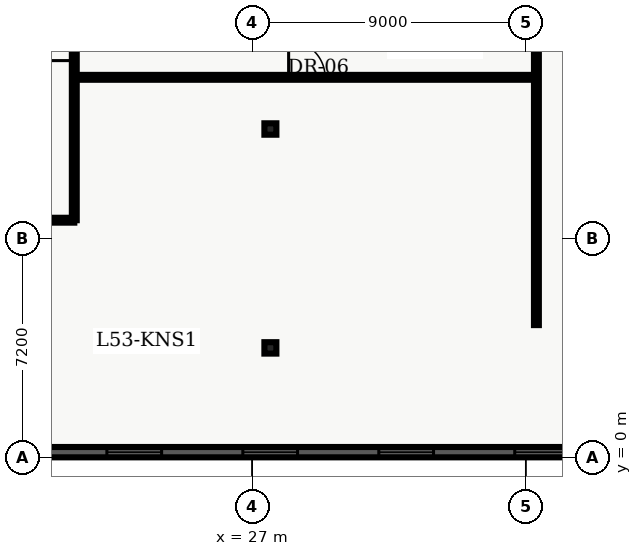
"""IFC4 building model, lengths in metres.
Left out: names, types, materials, properties, quantities, classifications, styles, units other than length and angle.
Written with IfcOpenShell. Run it as: python <this file> out.ifc"""

import sys

from ifc_helpers import new_model, entity, si_unit, converted_unit, direction, frame, origin_with_axes, origin_2d_with_axis, place, context, subcontext, project, spatial, polyline, rectangle, i_section, outline, extrude, element, fill, save


model = new_model("IFC4")
c1 = context("Model", 3, precision=1e-05, world=origin_with_axes(), true_north=direction((0.0, 1.0)))
c2 = subcontext(c1, "Body", "Model", "MODEL_VIEW")
j1 = project(units=[si_unit("LENGTHUNIT", "METRE"), converted_unit("PLANEANGLEUNIT", "DEGREE", entity("IfcPlaneAngleMeasure", 0.017), si_unit("PLANEANGLEUNIT", "RADIAN"), dimensions=[0, 0, 0, 0, 0, 0, 0])], contexts=[c1])
p1 = place(None, origin_with_axes())
s1 = spatial("IfcSite", under=j1, at=p1, CompositionType="ELEMENT")
p2 = place(p1, origin_with_axes())
s2 = spatial("IfcBuilding", under=s1, at=p2, CompositionType="ELEMENT")
p3 = place(p2, frame((0.0, 0.0, 216.0), z_axis=(0.0, 0.0, 1.0), x_axis=(1.0, 0.0, 0.0)))
s3 = spatial("IfcBuildingStorey", under=s2, at=p3, CompositionType="ELEMENT", Elevation=216.0)
for number, where, z_axis, x_axis in (
    (1, (27.6, 3.6, 0.0), (0.0, 0.0, 1.0), (1.0, 0.0, 0.0)),
    (2, (27.6, 10.8, 0.0), (0.0, 0.0, 1.0), (1.0, 0.0, 0.0)),
):
    element("IfcColumn", number, at=place(p3, frame(where, z_axis=z_axis, x_axis=x_axis)), inside=s3, PredefinedType="COLUMN", context=c2, shape_type="SweptSolid", body=[
        extrude(i_section(OverallWidth=0.394, OverallDepth=0.375, WebThickness=0.017, FlangeThickness=0.028, FilletRadius=0.02, at=origin_2d_with_axis()), origin_with_axes(), (0.0, 0.0, 1.0), 3.9),
    ])
p4 = place(p3, frame((2.6, 7.8, 0.0), z_axis=(0.0, 0.0, 1.0), x_axis=(1.0, 0.0, 0.0)))
e3 = element("IfcWall", 3, at=p4, inside=s3, PredefinedType="PARTITIONING", context=c2, shape_type="SweptSolid", body=[
    extrude(outline(polyline([(0.0, -0.08), (18.55, -0.08), (18.55, 0.08), (0.0, 0.08), (0.0, -0.08)])), origin_with_axes(), (0.0, 0.0, 1.0), 2.64),
])
p5 = place(p4, frame((2.158, 0.0, 0.0), z_axis=(0.0, 0.0, 1.0), x_axis=(1.0, 0.0, 0.0)))
e4 = element("IfcOpeningElement", 4, at=p5, cuts=e3, PredefinedType="OPENING", context=c2, shape_type="SweptSolid", body=[
    extrude(rectangle(XDim=1.0, YDim=0.18, at=origin_2d_with_axis()), origin_with_axes(), (0.0, 0.0, 1.0), 2.15),
])
p6 = place(p4, frame((6.563, 0.0, 0.0), z_axis=(0.0, 0.0, 1.0), x_axis=(1.0, 0.0, 0.0)))
e5 = element("IfcOpeningElement", 5, at=p6, cuts=e3, PredefinedType="OPENING", context=c2, shape_type="SweptSolid", body=[
    extrude(rectangle(XDim=1.0, YDim=0.18, at=origin_2d_with_axis()), origin_with_axes(), (0.0, 0.0, 1.0), 2.15),
])
p7 = place(p4, frame((11.931, 0.0, 0.0), z_axis=(0.0, 0.0, 1.0), x_axis=(1.0, 0.0, 0.0)))
e6 = element("IfcOpeningElement", 6, at=p7, cuts=e3, PredefinedType="OPENING", context=c2, shape_type="SweptSolid", body=[
    extrude(rectangle(XDim=1.0, YDim=0.18, at=origin_2d_with_axis()), origin_with_axes(), (0.0, 0.0, 1.0), 2.15),
])
p8 = place(p4, frame((16.501, 0.0, 0.0), z_axis=(0.0, 0.0, 1.0), x_axis=(1.0, 0.0, 0.0)))
e7 = element("IfcOpeningElement", 7, at=p8, cuts=e3, PredefinedType="OPENING", context=c2, shape_type="SweptSolid", body=[
    extrude(rectangle(XDim=1.0, YDim=0.18, at=origin_2d_with_axis()), origin_with_axes(), (0.0, 0.0, 1.0), 2.15),
])
p9 = place(p3, frame((21.15, 7.8, 0.0), z_axis=(0.0, 0.0, 1.0), x_axis=(0.0, 1.0, 0.0)))
e8 = element("IfcWall", 8, at=p9, inside=s3, PredefinedType="PARTITIONING", context=c2, shape_type="SweptSolid", body=[
    extrude(outline(polyline([(0.0, -0.08), (32.7, -0.08), (32.7, 0.08), (0.0, 0.08), (0.0, -0.08)])), origin_with_axes(), (0.0, 0.0, 1.0), 2.64),
])
p10 = place(p9, frame((16.495, 0.0, 0.0), z_axis=(0.0, 0.0, 1.0), x_axis=(1.0, 0.0, 0.0)))
e9 = element("IfcOpeningElement", 9, at=p10, cuts=e8, PredefinedType="OPENING", context=c2, shape_type="SweptSolid", body=[
    extrude(rectangle(XDim=1.0, YDim=0.18, at=origin_2d_with_axis()), origin_with_axes(), (0.0, 0.0, 1.0), 2.15),
])
p11 = place(p9, frame((22.084, 0.0, 0.0), z_axis=(0.0, 0.0, 1.0), x_axis=(1.0, 0.0, 0.0)))
e10 = element("IfcOpeningElement", 10, at=p11, cuts=e8, PredefinedType="OPENING", context=c2, shape_type="SweptSolid", body=[
    extrude(rectangle(XDim=1.0, YDim=0.18, at=origin_2d_with_axis()), origin_with_axes(), (0.0, 0.0, 1.0), 2.15),
])
p12 = place(p9, frame((28.839, 0.0, 0.0), z_axis=(0.0, 0.0, 1.0), x_axis=(1.0, 0.0, 0.0)))
e11 = element("IfcOpeningElement", 11, at=p12, cuts=e8, PredefinedType="OPENING", context=c2, shape_type="SweptSolid", body=[
    extrude(rectangle(XDim=1.0, YDim=0.18, at=origin_2d_with_axis()), origin_with_axes(), (0.0, 0.0, 1.0), 2.15),
])
p13 = place(p9, frame((5.775, 0.0, 0.0), z_axis=(0.0, 0.0, 1.0), x_axis=(1.0, 0.0, 0.0)))
e12 = element("IfcOpeningElement", 12, at=p13, cuts=e8, PredefinedType="OPENING", context=c2, shape_type="SweptSolid", body=[
    extrude(rectangle(XDim=1.05, YDim=0.18, at=origin_2d_with_axis()), origin_with_axes(), (0.0, 0.0, 1.0), 2.15),
])
p14 = place(p3, frame((21.15, 12.5, 0.0), z_axis=(0.0, 0.0, 1.0), x_axis=(1.0, 0.0, 0.0)))
e13 = element("IfcWall", 13, at=p14, inside=s3, PredefinedType="PARTITIONING", context=c2, shape_type="SweptSolid", body=[
    extrude(outline(polyline([(0.0, -0.08), (15.2, -0.08), (15.2, 0.08), (0.0, 0.08), (0.0, -0.08)])), origin_with_axes(), (0.0, 0.0, 1.0), 2.64),
])
p15 = place(p14, frame((7.65, 0.0, 0.0), z_axis=(0.0, 0.0, 1.0), x_axis=(1.0, 0.0, 0.0)))
e14 = element("IfcOpeningElement", 14, at=p15, cuts=e13, PredefinedType="OPENING", context=c2, shape_type="SweptSolid", body=[
    extrude(rectangle(XDim=1.2, YDim=0.18, at=origin_2d_with_axis()), origin_with_axes(), (0.0, 0.0, 1.0), 2.2),
])
p16 = place(p3, frame((36.35, 4.35, 0.0), z_axis=(0.0, 0.0, 1.0), x_axis=(0.0, 1.0, 0.0)))
e15 = element("IfcWall", 15, at=p16, inside=s3, PredefinedType="PARTITIONING", context=c2, shape_type="SweptSolid", body=[
    extrude(outline(polyline([(0.0, -0.08), (16.95, -0.08), (16.95, 0.08), (0.0, 0.08), (0.0, -0.08)])), origin_with_axes(), (0.0, 0.0, 1.0), 2.64),
])
p17 = place(p3, frame((57.26, 0.17, 0.0), z_axis=(0.0, 0.0, 1.0), x_axis=(-1.0, 0.0, 0.0)))
e16 = element("IfcWall", 16, at=p17, inside=s3, PredefinedType="SOLIDWALL", context=c2, shape_type="SweptSolid", body=[
    extrude(outline(polyline([(0.0, -0.17), (54.86, -0.17), (54.86, 0.17), (0.0, 0.17), (0.0, -0.17)])), origin_with_axes(), (0.0, 0.0, 1.0), 3.6),
])
p18 = place(p17, frame((2.836, 0.0, 0.45), z_axis=(0.0, 0.0, 1.0), x_axis=(1.0, 0.0, 0.0)))
e17 = element("IfcOpeningElement", 17, at=p18, cuts=e16, PredefinedType="OPENING", context=c2, shape_type="SweptSolid", body=[
    extrude(rectangle(XDim=1.8, YDim=0.36, at=origin_2d_with_axis()), origin_with_axes(), (0.0, 0.0, 1.0), 2.1),
])
p19 = place(p17, frame((7.307, 0.0, 0.45), z_axis=(0.0, 0.0, 1.0), x_axis=(1.0, 0.0, 0.0)))
e18 = element("IfcOpeningElement", 18, at=p19, cuts=e16, PredefinedType="OPENING", context=c2, shape_type="SweptSolid", body=[
    extrude(rectangle(XDim=1.8, YDim=0.36, at=origin_2d_with_axis()), origin_with_axes(), (0.0, 0.0, 1.0), 2.1),
])
p20 = place(p17, frame((11.779, 0.0, 0.45), z_axis=(0.0, 0.0, 1.0), x_axis=(1.0, 0.0, 0.0)))
e19 = element("IfcOpeningElement", 19, at=p20, cuts=e16, PredefinedType="OPENING", context=c2, shape_type="SweptSolid", body=[
    extrude(rectangle(XDim=1.8, YDim=0.36, at=origin_2d_with_axis()), origin_with_axes(), (0.0, 0.0, 1.0), 2.1),
])
p21 = place(p17, frame((16.251, 0.0, 0.45), z_axis=(0.0, 0.0, 1.0), x_axis=(1.0, 0.0, 0.0)))
e20 = element("IfcOpeningElement", 20, at=p21, cuts=e16, PredefinedType="OPENING", context=c2, shape_type="SweptSolid", body=[
    extrude(rectangle(XDim=1.8, YDim=0.36, at=origin_2d_with_axis()), origin_with_axes(), (0.0, 0.0, 1.0), 2.1),
])
p22 = place(p17, frame((20.723, 0.0, 0.45), z_axis=(0.0, 0.0, 1.0), x_axis=(1.0, 0.0, 0.0)))
e21 = element("IfcOpeningElement", 21, at=p22, cuts=e16, PredefinedType="OPENING", context=c2, shape_type="SweptSolid", body=[
    extrude(rectangle(XDim=1.8, YDim=0.36, at=origin_2d_with_axis()), origin_with_axes(), (0.0, 0.0, 1.0), 2.1),
])
p23 = place(p17, frame((25.194, 0.0, 0.45), z_axis=(0.0, 0.0, 1.0), x_axis=(1.0, 0.0, 0.0)))
e22 = element("IfcOpeningElement", 22, at=p23, cuts=e16, PredefinedType="OPENING", context=c2, shape_type="SweptSolid", body=[
    extrude(rectangle(XDim=1.8, YDim=0.36, at=origin_2d_with_axis()), origin_with_axes(), (0.0, 0.0, 1.0), 2.1),
])
p24 = place(p17, frame((29.666, 0.0, 0.45), z_axis=(0.0, 0.0, 1.0), x_axis=(1.0, 0.0, 0.0)))
e23 = element("IfcOpeningElement", 23, at=p24, cuts=e16, PredefinedType="OPENING", context=c2, shape_type="SweptSolid", body=[
    extrude(rectangle(XDim=1.8, YDim=0.36, at=origin_2d_with_axis()), origin_with_axes(), (0.0, 0.0, 1.0), 2.1),
])
p25 = place(p17, frame((34.138, 0.0, 0.45), z_axis=(0.0, 0.0, 1.0), x_axis=(1.0, 0.0, 0.0)))
e24 = element("IfcOpeningElement", 24, at=p25, cuts=e16, PredefinedType="OPENING", context=c2, shape_type="SweptSolid", body=[
    extrude(rectangle(XDim=1.8, YDim=0.36, at=origin_2d_with_axis()), origin_with_axes(), (0.0, 0.0, 1.0), 2.1),
])
p26 = place(p17, frame((38.159, 0.0, 0.45), z_axis=(0.0, 0.0, 1.0), x_axis=(1.0, 0.0, 0.0)))
e25 = element("IfcOpeningElement", 25, at=p26, cuts=e16, PredefinedType="OPENING", context=c2, shape_type="SweptSolid", body=[
    extrude(rectangle(XDim=1.8, YDim=0.36, at=origin_2d_with_axis()), origin_with_axes(), (0.0, 0.0, 1.0), 2.1),
])
p27 = place(p17, frame((43.081, 0.0, 0.45), z_axis=(0.0, 0.0, 1.0), x_axis=(1.0, 0.0, 0.0)))
e26 = element("IfcOpeningElement", 26, at=p27, cuts=e16, PredefinedType="OPENING", context=c2, shape_type="SweptSolid", body=[
    extrude(rectangle(XDim=1.8, YDim=0.36, at=origin_2d_with_axis()), origin_with_axes(), (0.0, 0.0, 1.0), 2.1),
])
p28 = place(p17, frame((47.553, 0.0, 0.45), z_axis=(0.0, 0.0, 1.0), x_axis=(1.0, 0.0, 0.0)))
e27 = element("IfcOpeningElement", 27, at=p28, cuts=e16, PredefinedType="OPENING", context=c2, shape_type="SweptSolid", body=[
    extrude(rectangle(XDim=1.8, YDim=0.36, at=origin_2d_with_axis()), origin_with_axes(), (0.0, 0.0, 1.0), 2.1),
])
p29 = place(p17, frame((52.024, 0.0, 0.45), z_axis=(0.0, 0.0, 1.0), x_axis=(1.0, 0.0, 0.0)))
e28 = element("IfcOpeningElement", 28, at=p29, cuts=e16, PredefinedType="OPENING", context=c2, shape_type="SweptSolid", body=[
    extrude(rectangle(XDim=1.8, YDim=0.36, at=origin_2d_with_axis()), origin_with_axes(), (0.0, 0.0, 1.0), 2.1),
])
p30 = place(p9, frame((5.775, 0.0, 0.0), z_axis=(0.0, 0.0, 1.0), x_axis=(1.0, 0.0, 0.0)))
e29 = element("IfcDoor", 29, at=p30, inside=s3, OperationType="SINGLE_SWING_LEFT", PredefinedType="DOOR", context=c2, shape_type="SweptSolid", body=[
    extrude(rectangle(XDim=1.05, YDim=0.09, at=origin_2d_with_axis()), origin_with_axes(), (0.0, 0.0, 1.0), 2.15),
])
fill(e12, e29)
p31 = place(p14, frame((7.65, 0.0, 0.0), z_axis=(0.0, 0.0, 1.0), x_axis=(1.0, 0.0, 0.0)))
e30 = element("IfcDoor", 30, at=p31, inside=s3, OperationType="SINGLE_SWING_LEFT", PredefinedType="DOOR", context=c2, shape_type="SweptSolid", body=[
    extrude(rectangle(XDim=1.2, YDim=0.09, at=origin_2d_with_axis()), origin_with_axes(), (0.0, 0.0, 1.0), 2.2),
])
fill(e14, e30)
p32 = place(p17, frame((20.723, 0.0, 0.45), z_axis=(0.0, 0.0, 1.0), x_axis=(1.0, 0.0, 0.0)))
e31 = element("IfcWindow", 31, at=p32, inside=s3, PredefinedType="WINDOW", context=c2, shape_type="SweptSolid", body=[
    extrude(rectangle(XDim=1.8, YDim=0.09, at=origin_2d_with_axis()), origin_with_axes(), (0.0, 0.0, 1.0), 2.1),
])
fill(e21, e31)
p33 = place(p17, frame((25.194, 0.0, 0.45), z_axis=(0.0, 0.0, 1.0), x_axis=(1.0, 0.0, 0.0)))
e32 = element("IfcWindow", 32, at=p33, inside=s3, PredefinedType="WINDOW", context=c2, shape_type="SweptSolid", body=[
    extrude(rectangle(XDim=1.8, YDim=0.09, at=origin_2d_with_axis()), origin_with_axes(), (0.0, 0.0, 1.0), 2.1),
])
fill(e22, e32)
p34 = place(p17, frame((29.666, 0.0, 0.45), z_axis=(0.0, 0.0, 1.0), x_axis=(1.0, 0.0, 0.0)))
e33 = element("IfcWindow", 33, at=p34, inside=s3, PredefinedType="WINDOW", context=c2, shape_type="SweptSolid", body=[
    extrude(rectangle(XDim=1.8, YDim=0.09, at=origin_2d_with_axis()), origin_with_axes(), (0.0, 0.0, 1.0), 2.1),
])
fill(e23, e33)
p35 = place(p17, frame((34.138, 0.0, 0.45), z_axis=(0.0, 0.0, 1.0), x_axis=(1.0, 0.0, 0.0)))
e34 = element("IfcWindow", 34, at=p35, inside=s3, PredefinedType="WINDOW", context=c2, shape_type="SweptSolid", body=[
    extrude(rectangle(XDim=1.8, YDim=0.09, at=origin_2d_with_axis()), origin_with_axes(), (0.0, 0.0, 1.0), 2.1),
])
fill(e24, e34)
save(model, sys.argv[1])
